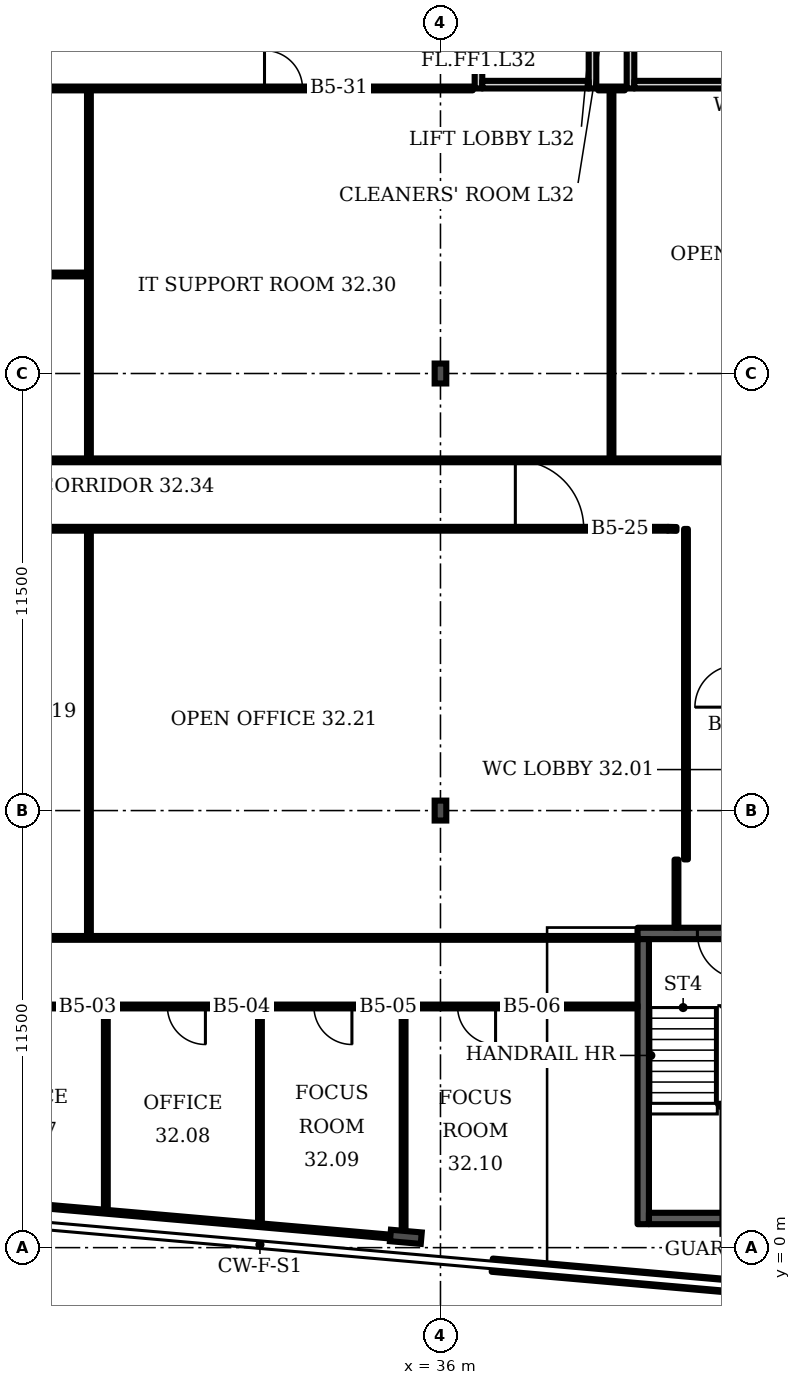
"""IFC4 building model, lengths in metres.
Left out: names, types, materials, properties, quantities, classifications, styles, units other than length and angle.
Written with IfcOpenShell. Run it as: python <this file> out.ifc"""

import sys

from ifc_helpers import new_model, si_unit, direction, frame, frame_2d, origin, origin_2d, place, context, subcontext, project, spatial, rectangle, i_section, extrude, element, fill, save


model = new_model("IFC4")
c1 = context("Model", 3, precision=1e-05, world=origin(), true_north=direction((0.0, 1.0)))
c2 = subcontext(c1, "Body", "Model", "MODEL_VIEW")
j1 = project(units=[si_unit("LENGTHUNIT", "METRE"), si_unit("PLANEANGLEUNIT", "RADIAN")], contexts=[c1])
p1 = place(None, origin())
s1 = spatial("IfcSite", under=j1, at=p1, CompositionType="ELEMENT")
p2 = place(p1, origin())
s2 = spatial("IfcBuilding", under=s1, at=p2, CompositionType="ELEMENT")
p3 = place(p2, frame((0.0, 0.0, 136.3)))
s3 = spatial("IfcBuildingStorey", under=s2, at=p3, CompositionType="ELEMENT", Elevation=136.3)
p4 = place(p3, frame((35.089, 0.285, 0.0), z_axis=(0.0, 0.0, 1.0), x_axis=(-0.087156, -0.996198, 0.0)))
e1 = element("IfcColumn", 1, at=p4, inside=s3, PredefinedType="COLUMN", context=c2, shape_type="SweptSolid", body=[
    extrude(i_section(OverallWidth=0.303, OverallDepth=0.814, WebThickness=0.021, FlangeThickness=0.04, FilletRadius=0.03, at=origin_2d()), origin(), (0.0, 0.0, 1.0), 3.6),
])
for number, where, z_axis, x_axis in (
    (2, (36.0, 11.5, 0.0), (0.0, 0.0, 1.0), (1.0, 0.0, 0.0)),
    (3, (36.0, 23.0, 0.0), (0.0, 0.0, 1.0), (1.0, 0.0, 0.0)),
):
    element("IfcColumn", number, at=place(p3, frame(where, z_axis=z_axis, x_axis=x_axis)), inside=s3, PredefinedType="COLUMN", context=c2, shape_type="SweptSolid", body=[
        extrude(i_section(OverallWidth=0.306, OverallDepth=0.524, WebThickness=0.021, FlangeThickness=0.04, FilletRadius=0.027, at=origin_2d()), origin(), (0.0, 0.0, 1.0), 3.6),
    ])
p5 = place(p3, frame((37.363, -0.461, 0.0), z_axis=(0.0, 0.0, 1.0), x_axis=(0.996194, -0.087159, 0.0)))
e4 = element("IfcWall", 4, at=p5, inside=s3, PredefinedType="SOLIDWALL", context=c2, shape_type="SweptSolid", body=[
    extrude(rectangle(XDim=12.199, YDim=0.35, at=frame_2d((6.099, 0.0))), origin(), (0.0, 0.0, 1.0), 1.0),
])
p6 = place(p3, frame((37.0, 30.5, 0.0), z_axis=(0.0, 0.0, 1.0), x_axis=(0.0, 1.0, 0.0)))
e5 = element("IfcWall", 5, at=p6, inside=s3, PredefinedType="PARTITIONING", context=c2, shape_type="SweptSolid", body=[
    extrude(rectangle(XDim=3.5, YDim=0.2, at=frame_2d((1.75, 0.0))), origin(), (0.0, 0.0, 1.0), 3.2),
])
p7 = place(p6, frame((1.2, 0.0, 0.0)))
e6 = element("IfcOpeningElement", 6, at=p7, cuts=e5, PredefinedType="OPENING", context=c2, shape_type="SweptSolid", body=[
    extrude(rectangle(XDim=1.1, YDim=2.1, at=frame_2d((0.55, 1.05))), frame((0.0, 0.11, 0.0), z_axis=(0.0, -1.0, 0.0), x_axis=(1.0, 0.0, 0.0)), (0.0, 0.0, 1.0), 0.22),
])
p8 = place(p3, frame((40.0, 30.5, 0.0), z_axis=(0.0, 0.0, 1.0), x_axis=(0.0, 1.0, 0.0)))
e7 = element("IfcWall", 7, at=p8, inside=s3, PredefinedType="PARTITIONING", context=c2, shape_type="SweptSolid", body=[
    extrude(rectangle(XDim=3.5, YDim=0.2, at=frame_2d((1.75, 0.0))), origin(), (0.0, 0.0, 1.0), 3.2),
])
p9 = place(p3, frame((37.1, 30.6, 0.0), z_axis=(0.0, 0.0, 1.0), x_axis=(1.0, 0.0, 0.0)))
e8 = element("IfcWall", 8, at=p9, inside=s3, PredefinedType="PARTITIONING", context=c2, shape_type="SweptSolid", body=[
    extrude(rectangle(XDim=2.8, YDim=0.2, at=frame_2d((1.4, 0.0))), origin(), (0.0, 0.0, 1.0), 3.2),
])
p10 = place(p3, frame((41.0, 30.5, 0.0), z_axis=(0.0, 0.0, 1.0), x_axis=(0.0, 1.0, 0.0)))
e9 = element("IfcWall", 9, at=p10, inside=s3, PredefinedType="PARTITIONING", context=c2, shape_type="SweptSolid", body=[
    extrude(rectangle(XDim=3.5, YDim=0.2, at=frame_2d((1.75, 0.0))), origin(), (0.0, 0.0, 1.0), 3.2),
])
p11 = place(p3, frame((41.1, 30.6, 0.0), z_axis=(0.0, 0.0, 1.0), x_axis=(1.0, 0.0, 0.0)))
e10 = element("IfcWall", 10, at=p11, inside=s3, PredefinedType="PARTITIONING", context=c2, shape_type="SweptSolid", body=[
    extrude(rectangle(XDim=2.8, YDim=0.2, at=frame_2d((1.4, 0.0))), origin(), (0.0, 0.0, 1.0), 3.2),
])
p12 = place(p3, frame((41.185, 8.267, 0.0), z_axis=(0.0, 0.0, 1.0), x_axis=(1.0, 0.0, 0.0)))
e11 = element("IfcWall", 11, at=p12, inside=s3, PredefinedType="SHEAR", context=c2, shape_type="SweptSolid", body=[
    extrude(rectangle(XDim=4.35, YDim=0.3, at=frame_2d((2.175, 0.0))), origin(), (0.0, 0.0, 1.0), 3.2),
])
p13 = place(p12, frame((1.575, 0.0, 0.0)))
e12 = element("IfcOpeningElement", 12, at=p13, cuts=e11, PredefinedType="OPENING", context=c2, shape_type="SweptSolid", body=[
    extrude(rectangle(XDim=1.2, YDim=2.1, at=frame_2d((0.6, 1.05))), frame((0.0, 0.16, 0.0), z_axis=(0.0, -1.0, 0.0), x_axis=(1.0, 0.0, 0.0)), (0.0, 0.0, 1.0), 0.32),
])
p14 = place(p3, frame((13.02, 6.345, 0.0), z_axis=(0.0, 0.0, 1.0), x_axis=(1.0, 0.0, 0.0)))
e13 = element("IfcWall", 13, at=p14, inside=s3, PredefinedType="PARTITIONING", context=c2, shape_type="SweptSolid", body=[
    extrude(rectangle(XDim=28.165, YDim=0.1, at=frame_2d((14.083, 0.0))), origin(), (0.0, 0.0, 1.0), 3.2),
])
p15 = place(p14, frame((2.6, 0.0, 0.0)))
e14 = element("IfcOpeningElement", 14, at=p15, cuts=e13, PredefinedType="OPENING", context=c2, shape_type="SweptSolid", body=[
    extrude(rectangle(XDim=1.0, YDim=2.1, at=frame_2d((0.5, 1.05))), frame((0.0, 0.06, 0.0), z_axis=(0.0, -1.0, 0.0), x_axis=(1.0, 0.0, 0.0)), (0.0, 0.0, 1.0), 0.12),
])
p16 = place(p14, frame((7.565, 0.0, 0.0)))
e15 = element("IfcOpeningElement", 15, at=p16, cuts=e13, PredefinedType="OPENING", context=c2, shape_type="SweptSolid", body=[
    extrude(rectangle(XDim=1.0, YDim=2.1, at=frame_2d((0.5, 1.05))), frame((0.0, 0.06, 0.0), z_axis=(0.0, -1.0, 0.0), x_axis=(1.0, 0.0, 0.0)), (0.0, 0.0, 1.0), 0.12),
])
p17 = place(p14, frame((11.74, 0.0, 0.0)))
e16 = element("IfcOpeningElement", 16, at=p17, cuts=e13, PredefinedType="OPENING", context=c2, shape_type="SweptSolid", body=[
    extrude(rectangle(XDim=1.0, YDim=2.1, at=frame_2d((0.5, 1.05))), frame((0.0, 0.06, 0.0), z_axis=(0.0, -1.0, 0.0), x_axis=(1.0, 0.0, 0.0)), (0.0, 0.0, 1.0), 0.12),
])
p18 = place(p14, frame((15.795, 0.0, 0.0)))
e17 = element("IfcOpeningElement", 17, at=p18, cuts=e13, PredefinedType="OPENING", context=c2, shape_type="SweptSolid", body=[
    extrude(rectangle(XDim=1.0, YDim=2.1, at=frame_2d((0.5, 1.05))), frame((0.0, 0.06, 0.0), z_axis=(0.0, -1.0, 0.0), x_axis=(1.0, 0.0, 0.0)), (0.0, 0.0, 1.0), 0.12),
])
p19 = place(p14, frame((19.65, 0.0, 0.0)))
e18 = element("IfcOpeningElement", 18, at=p19, cuts=e13, PredefinedType="OPENING", context=c2, shape_type="SweptSolid", body=[
    extrude(rectangle(XDim=1.0, YDim=2.1, at=frame_2d((0.5, 1.05))), frame((0.0, 0.06, 0.0), z_axis=(0.0, -1.0, 0.0), x_axis=(1.0, 0.0, 0.0)), (0.0, 0.0, 1.0), 0.12),
])
p20 = place(p14, frame((23.43, 0.0, 0.0)))
e19 = element("IfcOpeningElement", 19, at=p20, cuts=e13, PredefinedType="OPENING", context=c2, shape_type="SweptSolid", body=[
    extrude(rectangle(XDim=1.0, YDim=2.1, at=frame_2d((0.5, 1.05))), frame((0.0, 0.06, 0.0), z_axis=(0.0, -1.0, 0.0), x_axis=(1.0, 0.0, 0.0)), (0.0, 0.0, 1.0), 0.12),
])
p21 = place(p3, frame((17.12, 8.15, 0.0), z_axis=(0.0, 0.0, 1.0), x_axis=(1.0, 0.0, 0.0)))
e20 = element("IfcWall", 20, at=p21, inside=s3, PredefinedType="PARTITIONING", context=c2, shape_type="SweptSolid", body=[
    extrude(rectangle(XDim=24.065, YDim=0.1, at=frame_2d((12.033, 0.0))), origin(), (0.0, 0.0, 1.0), 3.2),
])
p22 = place(p3, frame((18.2, 25.605, 0.0), z_axis=(0.0, 0.0, 1.0), x_axis=(1.0, 0.0, 0.0)))
e21 = element("IfcWall", 21, at=p22, inside=s3, PredefinedType="PARTITIONING", context=c2, shape_type="SweptSolid", body=[
    extrude(rectangle(XDim=8.55, YDim=0.1, at=frame_2d((4.275, 0.0))), origin(), (0.0, 0.0, 1.0), 3.2),
])
p23 = place(p3, frame((18.2, 30.5, 0.0), z_axis=(0.0, 0.0, 1.0), x_axis=(1.0, 0.0, 0.0)))
e22 = element("IfcWall", 22, at=p23, inside=s3, PredefinedType="PARTITIONING", context=c2, shape_type="SweptSolid", body=[
    extrude(rectangle(XDim=18.65, YDim=0.1, at=frame_2d((9.325, 0.0))), origin(), (0.0, 0.0, 1.0), 3.2),
])
p24 = place(p23, frame((1.33, 0.0, 0.0)))
e23 = element("IfcOpeningElement", 23, at=p24, cuts=e22, PredefinedType="OPENING", context=c2, shape_type="SweptSolid", body=[
    extrude(rectangle(XDim=1.0, YDim=2.1, at=frame_2d((0.5, 1.05))), frame((0.0, 0.06, 0.0), z_axis=(0.0, -1.0, 0.0), x_axis=(1.0, 0.0, 0.0)), (0.0, 0.0, 1.0), 0.12),
])
p25 = place(p23, frame((13.17, 0.0, 0.0)))
e24 = element("IfcOpeningElement", 24, at=p25, cuts=e22, PredefinedType="OPENING", context=c2, shape_type="SweptSolid", body=[
    extrude(rectangle(XDim=1.0, YDim=2.1, at=frame_2d((0.5, 1.05))), frame((0.0, 0.06, 0.0), z_axis=(0.0, -1.0, 0.0), x_axis=(1.0, 0.0, 0.0)), (0.0, 0.0, 1.0), 0.12),
])
p26 = place(p3, frame((18.505, 20.715, 0.0), z_axis=(0.0, 0.0, 1.0), x_axis=(1.0, 0.0, 0.0)))
e25 = element("IfcWall", 25, at=p26, inside=s3, PredefinedType="PARTITIONING", context=c2, shape_type="SweptSolid", body=[
    extrude(rectangle(XDim=49.385, YDim=0.1, at=frame_2d((24.692, 0.0))), origin(), (0.0, 0.0, 1.0), 3.2),
])
p27 = place(p26, frame((1.025, 0.0, 0.0)))
e26 = element("IfcOpeningElement", 26, at=p27, cuts=e25, PredefinedType="OPENING", context=c2, shape_type="SweptSolid", body=[
    extrude(rectangle(XDim=1.0, YDim=2.1, at=frame_2d((0.5, 1.05))), frame((0.0, 0.06, 0.0), z_axis=(0.0, -1.0, 0.0), x_axis=(1.0, 0.0, 0.0)), (0.0, 0.0, 1.0), 0.12),
])
p28 = place(p3, frame((19.02, 18.915, 0.0), z_axis=(0.0, 0.0, 1.0), x_axis=(1.0, 0.0, 0.0)))
e27 = element("IfcWall", 27, at=p28, inside=s3, PredefinedType="PARTITIONING", context=c2, shape_type="SweptSolid", body=[
    extrude(rectangle(XDim=22.965, YDim=0.1, at=frame_2d((11.482, 0.0))), origin(), (0.0, 0.0, 1.0), 3.2),
])
p29 = place(p28, frame((3.755, 0.0, 0.0)))
e28 = element("IfcOpeningElement", 28, at=p29, cuts=e27, PredefinedType="OPENING", context=c2, shape_type="SweptSolid", body=[
    extrude(rectangle(XDim=1.0, YDim=2.1, at=frame_2d((0.5, 1.05))), frame((0.0, 0.06, 0.0), z_axis=(0.0, -1.0, 0.0), x_axis=(1.0, 0.0, 0.0)), (0.0, 0.0, 1.0), 0.12),
])
p30 = place(p28, frame((18.95, 0.0, 0.0)))
e29 = element("IfcOpeningElement", 29, at=p30, cuts=e27, PredefinedType="OPENING", context=c2, shape_type="SweptSolid", body=[
    extrude(rectangle(XDim=1.8, YDim=2.1, at=frame_2d((0.9, 1.05))), frame((0.0, 0.06, 0.0), z_axis=(0.0, -1.0, 0.0), x_axis=(1.0, 0.0, 0.0)), (0.0, 0.0, 1.0), 0.12),
])
p31 = place(p3, frame((26.75, 8.15, 0.0), z_axis=(0.0, 0.0, 1.0), x_axis=(0.0, 1.0, 0.0)))
e30 = element("IfcWall", 30, at=p31, inside=s3, PredefinedType="PARTITIONING", context=c2, shape_type="SweptSolid", body=[
    extrude(rectangle(XDim=10.765, YDim=0.1, at=frame_2d((5.383, 0.0))), origin(), (0.0, 0.0, 1.0), 3.2),
])
p32 = place(p3, frame((26.75, 20.715, 0.0), z_axis=(0.0, 0.0, 1.0), x_axis=(0.0, 1.0, 0.0)))
e31 = element("IfcWall", 31, at=p32, inside=s3, PredefinedType="PARTITIONING", context=c2, shape_type="SweptSolid", body=[
    extrude(rectangle(XDim=9.785, YDim=0.1, at=frame_2d((4.893, 0.0))), origin(), (0.0, 0.0, 1.0), 3.2),
])
p33 = place(p3, frame((27.195, 0.945, 0.0), z_axis=(0.0, 0.0, 1.0), x_axis=(0.0, 1.0, 0.0)))
e32 = element("IfcWall", 32, at=p33, inside=s3, PredefinedType="PARTITIONING", context=c2, shape_type="SweptSolid", body=[
    extrude(rectangle(XDim=5.4, YDim=0.1, at=frame_2d((2.7, 0.0))), origin(), (0.0, 0.0, 1.0), 3.2),
])
p34 = place(p3, frame((31.25, 0.59, 0.0), z_axis=(0.0, 0.0, 1.0), x_axis=(0.0, 1.0, 0.0)))
e33 = element("IfcWall", 33, at=p34, inside=s3, PredefinedType="PARTITIONING", context=c2, shape_type="SweptSolid", body=[
    extrude(rectangle(XDim=5.755, YDim=0.1, at=frame_2d((2.877, 0.0))), origin(), (0.0, 0.0, 1.0), 3.2),
])
p35 = place(p3, frame((35.03, 0.26, 0.0), z_axis=(0.0, 0.0, 1.0), x_axis=(0.0, 1.0, 0.0)))
e34 = element("IfcWall", 34, at=p35, inside=s3, PredefinedType="PARTITIONING", context=c2, shape_type="SweptSolid", body=[
    extrude(rectangle(XDim=6.085, YDim=0.1, at=frame_2d((3.042, 0.0))), origin(), (0.0, 0.0, 1.0), 3.2),
])
p36 = place(p3, frame((35.03, 0.26, 0.0), z_axis=(0.0, 0.0, 1.0), x_axis=(-0.996214, 0.086976, 0.0)))
e35 = element("IfcWall", 35, at=p36, inside=s3, PredefinedType="PARTITIONING", context=c2, shape_type="SweptSolid", body=[
    extrude(rectangle(XDim=10.352, YDim=0.1, at=frame_2d((5.176, 0.0))), origin(), (0.0, 0.0, 1.0), 2.58),
])
p37 = place(p3, frame((40.5, 20.715, 0.0), z_axis=(0.0, 0.0, 1.0), x_axis=(0.0, 1.0, 0.0)))
e36 = element("IfcWall", 36, at=p37, inside=s3, PredefinedType="PARTITIONING", context=c2, shape_type="SweptSolid", body=[
    extrude(rectangle(XDim=9.785, YDim=0.1, at=frame_2d((4.893, 0.0))), origin(), (0.0, 0.0, 1.0), 3.2),
])
p38 = place(p3, frame((42.21, 8.417, 0.0), z_axis=(0.0, 0.0, 1.0), x_axis=(0.0, 1.0, 0.0)))
e37 = element("IfcWall", 37, at=p38, inside=s3, PredefinedType="PARTITIONING", context=c2, shape_type="SweptSolid", body=[
    extrude(rectangle(XDim=1.793, YDim=0.1, at=frame_2d((0.896, 0.0))), origin(), (0.0, 0.0, 1.0), 3.2),
])
p39 = place(p3, frame((42.21, 18.91, 0.0), z_axis=(0.0, 0.0, 1.0), x_axis=(-0.999736, 0.022795, 0.0)))
e38 = element("IfcWall", 38, at=p39, inside=s3, PredefinedType="PARTITIONING", context=c2, shape_type="SweptSolid", body=[
    extrude(rectangle(XDim=0.225, YDim=0.1, at=frame_2d((0.112, 0.0))), origin(), (0.0, 0.0, 1.0), 3.2),
])
p40 = place(p3, frame((42.46, 10.215, 0.0), z_axis=(0.0, 0.0, 1.0), x_axis=(0.0, 1.0, 0.0)))
e39 = element("IfcWall", 39, at=p40, inside=s3, PredefinedType="PARTITIONING", context=c2, shape_type="SweptSolid", body=[
    extrude(rectangle(XDim=8.695, YDim=0.1, at=frame_2d((4.347, 0.0))), origin(), (0.0, 0.0, 1.0), 3.2),
])
p41 = place(p3, frame((40.15, 30.5, 0.0), z_axis=(0.0, 0.0, 1.0), x_axis=(1.0, 0.0, 0.0)))
e40 = element("IfcWall", 40, at=p41, inside=s3, PredefinedType="PARTITIONING", context=c2, shape_type="SweptSolid", body=[
    extrude(rectangle(XDim=0.7, YDim=0.1, at=frame_2d((0.35, 0.0))), origin(), (0.0, 0.0, 1.0), 3.2),
])
p42 = place(p3, frame((41.335, 0.617, 0.0), z_axis=(0.0, 0.0, 1.0), x_axis=(0.0, 1.0, 0.0)))
e41 = element("IfcWall", 41, at=p42, inside=s3, PredefinedType="SHEAR", context=c2, shape_type="SweptSolid", body=[
    extrude(rectangle(XDim=7.5, YDim=0.3, at=frame_2d((3.75, 0.0))), origin(), (0.0, 0.0, 1.0), 3.2),
])
p43 = place(p3, frame((41.485, 0.767, 0.0), z_axis=(0.0, 0.0, 1.0), x_axis=(1.0, 0.0, 0.0)))
e42 = element("IfcWall", 42, at=p43, inside=s3, PredefinedType="SHEAR", context=c2, shape_type="SweptSolid", body=[
    extrude(rectangle(XDim=3.75, YDim=0.3, at=frame_2d((1.875, 0.0))), origin(), (0.0, 0.0, 1.0), 3.2),
])
p44 = place(p13, origin())
e43 = element("IfcDoor", 43, at=p44, inside=s3, OperationType="SINGLE_SWING_RIGHT", PredefinedType="DOOR", context=c2, shape_type="SweptSolid", body=[
    extrude(rectangle(XDim=1.2, YDim=2.1, at=frame_2d((0.6, 1.05))), frame((0.0, 0.025, 0.0), z_axis=(0.0, -1.0, 0.0), x_axis=(1.0, 0.0, 0.0)), (0.0, 0.0, 1.0), 0.05),
])
fill(e12, e43)
p45 = place(p18, origin())
e44 = element("IfcDoor", 44, at=p45, inside=s3, OperationType="SINGLE_SWING_RIGHT", PredefinedType="DOOR", context=c2, shape_type="SweptSolid", body=[
    extrude(rectangle(XDim=1.0, YDim=2.1, at=frame_2d((0.5, 1.05))), frame((0.0, 0.025, 0.0), z_axis=(0.0, -1.0, 0.0), x_axis=(1.0, 0.0, 0.0)), (0.0, 0.0, 1.0), 0.05),
])
fill(e17, e44)
p46 = place(p19, origin())
e45 = element("IfcDoor", 45, at=p46, inside=s3, OperationType="SINGLE_SWING_RIGHT", PredefinedType="DOOR", context=c2, shape_type="SweptSolid", body=[
    extrude(rectangle(XDim=1.0, YDim=2.1, at=frame_2d((0.5, 1.05))), frame((0.0, 0.025, 0.0), z_axis=(0.0, -1.0, 0.0), x_axis=(1.0, 0.0, 0.0)), (0.0, 0.0, 1.0), 0.05),
])
fill(e18, e45)
p47 = place(p20, origin())
e46 = element("IfcDoor", 46, at=p47, inside=s3, OperationType="SINGLE_SWING_RIGHT", PredefinedType="DOOR", context=c2, shape_type="SweptSolid", body=[
    extrude(rectangle(XDim=1.0, YDim=2.1, at=frame_2d((0.5, 1.05))), frame((0.0, 0.025, 0.0), z_axis=(0.0, -1.0, 0.0), x_axis=(1.0, 0.0, 0.0)), (0.0, 0.0, 1.0), 0.05),
])
fill(e19, e46)
p48 = place(p30, origin())
e47 = element("IfcDoor", 47, at=p48, inside=s3, OperationType="DOUBLE_DOOR_SINGLE_SWING", PredefinedType="DOOR", context=c2, shape_type="SweptSolid", body=[
    extrude(rectangle(XDim=1.8, YDim=2.1, at=frame_2d((0.9, 1.05))), frame((0.0, 0.025, 0.0), z_axis=(0.0, -1.0, 0.0), x_axis=(1.0, 0.0, 0.0)), (0.0, 0.0, 1.0), 0.05),
])
fill(e29, e47)
p49 = place(p25, origin())
e48 = element("IfcDoor", 48, at=p49, inside=s3, OperationType="SINGLE_SWING_LEFT", PredefinedType="DOOR", context=c2, shape_type="SweptSolid", body=[
    extrude(rectangle(XDim=1.0, YDim=2.1, at=frame_2d((0.5, 1.05))), frame((0.0, 0.025, 0.0), z_axis=(0.0, -1.0, 0.0), x_axis=(1.0, 0.0, 0.0)), (0.0, 0.0, 1.0), 0.05),
])
fill(e24, e48)
save(model, sys.argv[1])
